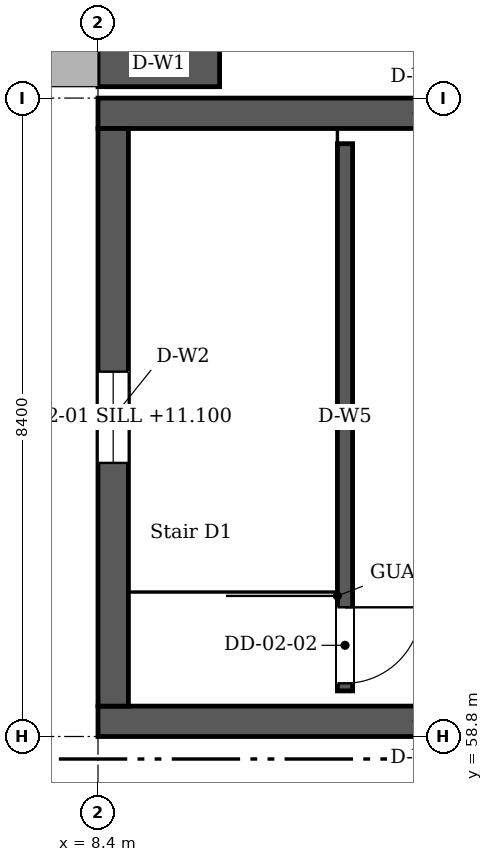
"""IFC4 building model, lengths in metres.
Left out: names, types, materials, properties, quantities, classifications, styles, units other than length and angle.
Written with IfcOpenShell. Run it as: python <this file> out.ifc"""

import sys

from ifc_helpers import new_model, si_unit, direction, frame, frame_2d, origin, place, context, subcontext, project, spatial, rectangle, extrude, element, fill, save


model = new_model("IFC4")
c1 = context("Model", 3, precision=1e-05, world=origin(), true_north=direction((0.0, 1.0)))
c2 = subcontext(c1, "Body", "Model", "MODEL_VIEW")
j1 = project(units=[si_unit("LENGTHUNIT", "METRE"), si_unit("PLANEANGLEUNIT", "RADIAN")], contexts=[c1])
p1 = place(None, origin())
s1 = spatial("IfcSite", under=j1, at=p1, CompositionType="ELEMENT")
p2 = place(p1, origin())
s2 = spatial("IfcBuilding", under=s1, at=p2, CompositionType="ELEMENT")
p3 = place(p2, origin())
s3 = spatial("IfcBuildingStorey", under=s2, at=p3, CompositionType="ELEMENT", Elevation=0.0)
p4 = place(p3, frame((8.4, 67.65, 0.0), z_axis=(0.0, 0.0, 1.0), x_axis=(1.0, 0.0, 0.0)))
e1 = element("IfcWall", 1, at=p4, inside=s3, PredefinedType="SOLIDWALL", context=c2, shape_type="SweptSolid", body=[
    extrude(rectangle(XDim=1.6, YDim=0.6, at=frame_2d((0.8, 0.0))), origin(), (0.0, 0.0, 1.0), 14.467),
])
p5 = place(p2, frame((0.0, 0.0, 10.2)))
s4 = spatial("IfcBuildingStorey", under=s2, at=p5, CompositionType="ELEMENT", Elevation=10.2)
for number, where, z_axis, x_axis in (
    (2, (8.4, 59.0, 0.0), (0.0, 0.0, 1.0), (1.0, 0.0, 0.0)),
    (3, (8.4, 67.0, 0.0), (0.0, 0.0, 1.0), (1.0, 0.0, 0.0)),
):
    element("IfcWall", number, at=place(p5, frame(where, z_axis=z_axis, x_axis=x_axis)), inside=s4, PredefinedType="SOLIDWALL", context=c2, shape_type="SweptSolid", body=[
        extrude(rectangle(XDim=8.4, YDim=0.4, at=frame_2d((4.2, 0.0))), origin(), (0.0, 0.0, 1.0), 3.92),
    ])
p6 = place(p5, frame((8.6, 59.2, 0.0), z_axis=(0.0, 0.0, 1.0), x_axis=(0.0, 1.0, 0.0)))
e4 = element("IfcWall", 4, at=p6, inside=s4, PredefinedType="SOLIDWALL", context=c2, shape_type="SweptSolid", body=[
    extrude(rectangle(XDim=7.6, YDim=0.4, at=frame_2d((3.8, 0.0))), origin(), (0.0, 0.0, 1.0), 3.92),
])
p7 = place(p6, frame((3.2, 0.0, 0.9)))
e5 = element("IfcOpeningElement", 5, at=p7, cuts=e4, PredefinedType="OPENING", context=c2, shape_type="SweptSolid", body=[
    extrude(rectangle(XDim=1.2, YDim=1.5, at=frame_2d((0.6, 0.75))), frame((0.0, 0.21, 0.0), z_axis=(0.0, -1.0, 0.0), x_axis=(1.0, 0.0, 0.0)), (0.0, 0.0, 1.0), 0.42),
])
p8 = place(p5, frame((11.65, 59.4, 0.0), z_axis=(0.0, 0.0, 1.0), x_axis=(0.0, 1.0, 0.0)))
e6 = element("IfcWall", 6, at=p8, inside=s4, PredefinedType="SOLIDWALL", context=c2, shape_type="SweptSolid", body=[
    extrude(rectangle(XDim=7.2, YDim=0.2, at=frame_2d((3.6, 0.0))), origin(), (0.0, 0.0, 1.0), 3.92),
])
p9 = place(p8, frame((0.1, 0.0, 0.0)))
e7 = element("IfcOpeningElement", 7, at=p9, cuts=e6, PredefinedType="OPENING", context=c2, shape_type="SweptSolid", body=[
    extrude(rectangle(XDim=1.0, YDim=2.1, at=frame_2d((0.5, 1.05))), frame((0.0, 0.11, 0.0), z_axis=(0.0, -1.0, 0.0), x_axis=(1.0, 0.0, 0.0)), (0.0, 0.0, 1.0), 0.22),
])
p10 = place(p7, origin())
e8 = element("IfcWindow", 8, at=p10, inside=s4, PartitioningType="SINGLE_PANEL", PredefinedType="WINDOW", context=c2, shape_type="SweptSolid", body=[
    extrude(rectangle(XDim=1.2, YDim=1.5, at=frame_2d((0.6, 0.75))), frame((0.0, 0.03, 0.0), z_axis=(0.0, -1.0, 0.0), x_axis=(1.0, 0.0, 0.0)), (0.0, 0.0, 1.0), 0.06),
])
fill(e5, e8)
p11 = place(p9, origin())
e9 = element("IfcDoor", 9, at=p11, inside=s4, OperationType="SINGLE_SWING_LEFT", PredefinedType="DOOR", context=c2, shape_type="SweptSolid", body=[
    extrude(rectangle(XDim=1.0, YDim=2.1, at=frame_2d((0.5, 1.05))), frame((0.0, 0.025, 0.0), z_axis=(0.0, -1.0, 0.0), x_axis=(1.0, 0.0, 0.0)), (0.0, 0.0, 1.0), 0.05),
])
fill(e7, e9)
save(model, sys.argv[1])
